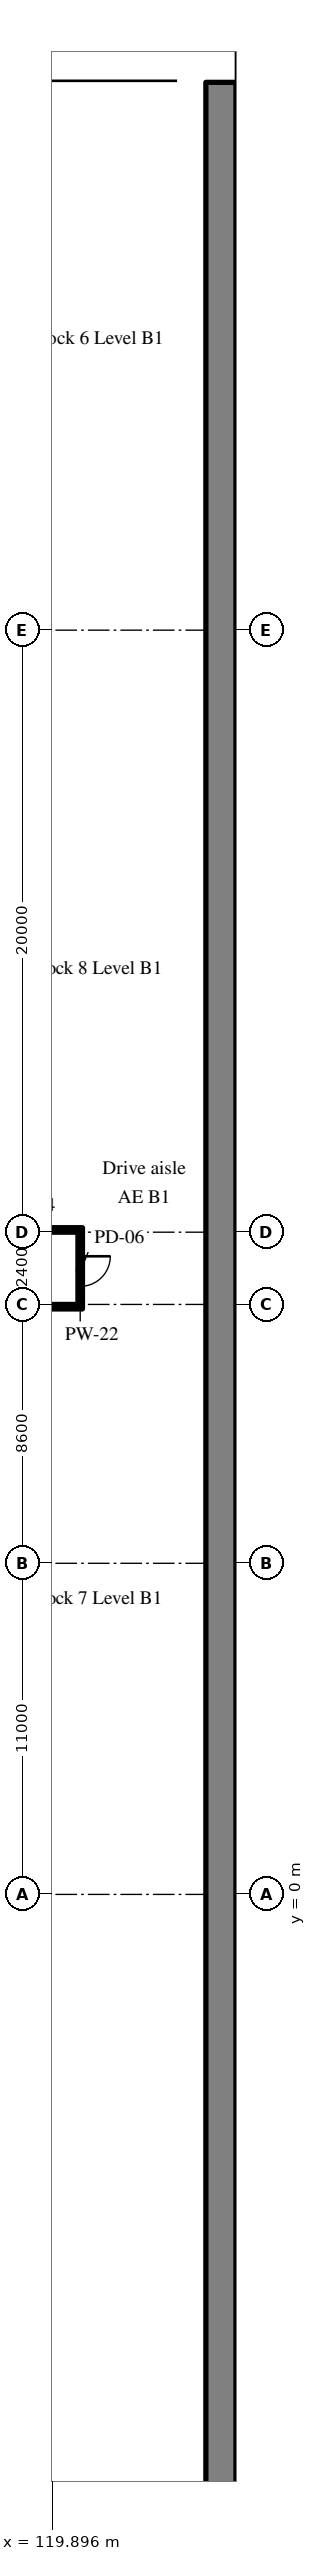
"""IFC4 building model, lengths in metres.
Left out: names, types, materials, properties, quantities, classifications, styles, units other than length and angle.
Written with IfcOpenShell. Run it as: python <this file> out.ifc"""

import sys

from ifc_helpers import new_model, si_unit, direction, frame, frame_2d, origin, place, context, subcontext, project, spatial, rectangle, extrude, source, transform, mapped, element, fill, save


model = new_model("IFC4")
c1 = context("Model", 3, precision=1e-05, world=origin(), true_north=direction((0.0, 1.0)))
c2 = subcontext(c1, "Body", "Model", "MODEL_VIEW")
j1 = project(units=[si_unit("LENGTHUNIT", "METRE"), si_unit("PLANEANGLEUNIT", "RADIAN")], contexts=[c1])
p1 = place(None, origin())
s1 = spatial("IfcSite", under=j1, at=p1, CompositionType="ELEMENT")
p2 = place(p1, origin())
s2 = spatial("IfcBuilding", under=s1, at=p2, CompositionType="ELEMENT")
p3 = place(p2, frame((0.0, 0.0, -4.5)))
s3 = spatial("IfcBuildingStorey", under=s2, at=p3, CompositionType="ELEMENT", Elevation=-4.5)
m1 = source(origin(), c2, "Body", "SweptSolid", [
    extrude(rectangle(XDim=92.8, YDim=1.0, at=frame_2d((46.4, 0.0))), origin(), (0.0, 0.0, 1.0), 4.22),
])
p4 = place(p3, frame((125.5, -32.6, 0.0), z_axis=(0.0, 0.0, 1.0), x_axis=(0.0, 1.0, 0.0)))
e1 = element("IfcWall", 1, at=p4, inside=s3, PredefinedType="SHEAR", context=c2, shape_type="MappedRepresentation", body=[
    mapped(m1, transform((0.0, 0.0, 0.0), scale=1.0)),
])
m2 = source(origin(), c2, "Body", "SweptSolid", [
    extrude(rectangle(XDim=20.1, YDim=0.15, at=frame_2d((10.05, 0.0))), origin(), (0.0, 0.0, 1.0), 4.22),
])
p5 = place(p3, frame((100.8, 19.525, 0.0), z_axis=(0.0, 0.0, 1.0), x_axis=(1.0, 0.0, 0.0)))
e2 = element("IfcWall", 2, at=p5, inside=s3, PredefinedType="PARTITIONING", context=c2, shape_type="MappedRepresentation", body=[
    mapped(m2, transform((0.0, 0.0, 0.0), scale=1.0)),
])
m3 = source(origin(), c2, "Body", "SweptSolid", [
    extrude(rectangle(XDim=1.0, YDim=2.1, at=frame_2d((0.5, 1.05))), frame((0.0, 0.085, 0.0), z_axis=(0.0, -1.0, 0.0), x_axis=(1.0, 0.0, 0.0)), (0.0, 0.0, 1.0), 0.17),
])
p6 = place(p5, frame((17.4, 0.0, 0.0)))
e3 = element("IfcOpeningElement", 3, at=p6, cuts=e2, PredefinedType="OPENING", context=c2, shape_type="MappedRepresentation", body=[
    mapped(m3, transform((0.0, 0.0, 0.0), scale=1.0)),
])
p7 = place(p3, frame((100.8, 22.075, 0.0), z_axis=(0.0, 0.0, 1.0), x_axis=(1.0, 0.0, 0.0)))
e4 = element("IfcWall", 4, at=p7, inside=s3, PredefinedType="PARTITIONING", context=c2, shape_type="MappedRepresentation", body=[
    mapped(m2, transform((0.0, 0.0, 0.0), scale=1.0)),
])
p8 = place(p7, frame((17.4, 0.0, 0.0)))
e5 = element("IfcOpeningElement", 5, at=p8, cuts=e4, PredefinedType="OPENING", context=c2, shape_type="MappedRepresentation", body=[
    mapped(m3, transform((0.0, 0.0, 0.0), scale=1.0)),
])
m4 = source(origin(), c2, "Body", "SweptSolid", [
    extrude(rectangle(XDim=2.4, YDim=0.15, at=frame_2d((1.2, 0.0))), origin(), (0.0, 0.0, 1.0), 4.22),
])
p9 = place(p3, frame((120.825, 19.6, 0.0), z_axis=(0.0, 0.0, 1.0), x_axis=(0.0, 1.0, 0.0)))
e6 = element("IfcWall", 6, at=p9, inside=s3, PredefinedType="PARTITIONING", context=c2, shape_type="MappedRepresentation", body=[
    mapped(m4, transform((0.0, 0.0, 0.0), scale=1.0)),
])
p10 = place(p9, frame((0.6, 0.0, 0.0)))
e7 = element("IfcOpeningElement", 7, at=p10, cuts=e6, PredefinedType="OPENING", context=c2, shape_type="MappedRepresentation", body=[
    mapped(m3, transform((0.0, 0.0, 0.0), scale=1.0)),
])
m5 = source(origin(), c2, "Body", "SweptSolid", [
    extrude(rectangle(XDim=1.0, YDim=2.1, at=frame_2d((0.5, 1.05))), frame((0.0, 0.025, 0.0), z_axis=(0.0, -1.0, 0.0), x_axis=(1.0, 0.0, 0.0)), (0.0, 0.0, 1.0), 0.05),
])
p11 = place(p10, origin())
e8 = element("IfcDoor", 8, at=p11, inside=s3, OperationType="SINGLE_SWING_RIGHT", PredefinedType="DOOR", context=c2, shape_type="MappedRepresentation", body=[
    mapped(m5, transform((0.0, 0.0, 0.0), scale=1.0)),
])
fill(e7, e8)
save(model, sys.argv[1])
